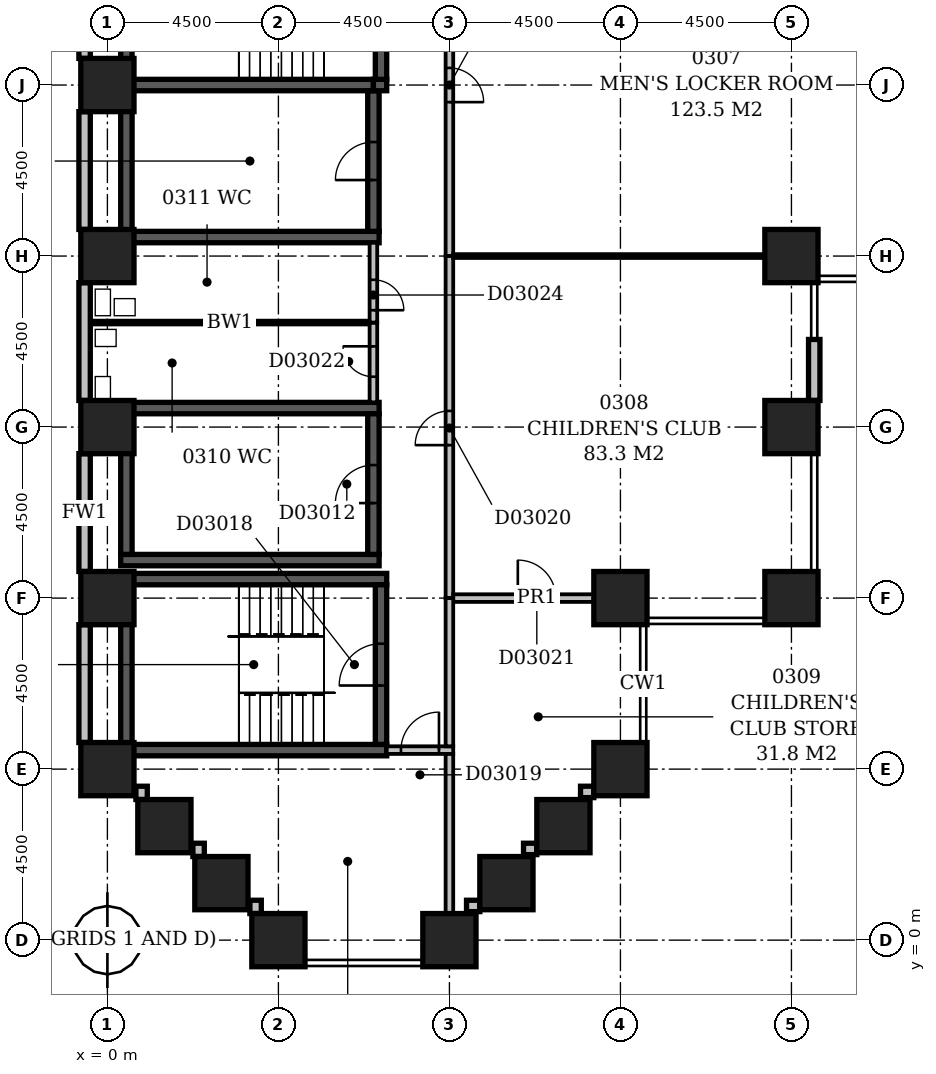
"""IFC4 building model, lengths in metres.
Left out: names, types, materials, properties, quantities, classifications, styles, units other than length and angle.
Written with IfcOpenShell. Run it as: python <this file> out.ifc"""

import sys

from ifc_helpers import new_model, si_unit, direction, frame, frame_2d, origin, origin_2d, place, context, subcontext, project, spatial, rectangle, extrude, element, fill, save


model = new_model("IFC4")
c1 = context("Model", 3, precision=1e-05, world=origin(), true_north=direction((0.0, 1.0)))
c2 = subcontext(c1, "Body", "Model", "MODEL_VIEW")
j1 = project(units=[si_unit("LENGTHUNIT", "METRE"), si_unit("PLANEANGLEUNIT", "RADIAN")], contexts=[c1])
p1 = place(None, origin())
s1 = spatial("IfcSite", under=j1, at=p1, CompositionType="ELEMENT")
p2 = place(p1, origin())
s2 = spatial("IfcBuilding", under=s1, at=p2, CompositionType="ELEMENT")
p3 = place(p2, frame((0.0, 0.0, 19.0)))
s3 = spatial("IfcBuildingStorey", under=s2, at=p3, CompositionType="ELEMENT", Elevation=19.0)
for number, where, z_axis, x_axis in (
    (1, (0.35, 5.0, -0.4), (0.0, 0.0, 1.0), (1.0, 0.0, 0.0)),
    (2, (0.35, 9.5, -0.4), (0.0, 0.0, 1.0), (1.0, 0.0, 0.0)),
):
    element("IfcWall", number, at=place(p3, frame(where, z_axis=z_axis, x_axis=x_axis)), inside=s3, PredefinedType="SHEAR", context=c2, shape_type="SweptSolid", body=[
        extrude(rectangle(XDim=7.0, YDim=0.3, at=frame_2d((3.5, 0.0))), origin(), (0.0, 0.0, 1.0), 4.95),
    ])
for number, where, z_axis, x_axis in (
    (3, (0.35, 10.0, -0.4), (0.0, 0.0, 1.0), (1.0, 0.0, 0.0)),
    (4, (0.35, 14.0, -0.4), (0.0, 0.0, 1.0), (1.0, 0.0, 0.0)),
    (5, (0.35, 18.5, -0.4), (0.0, 0.0, 1.0), (1.0, 0.0, 0.0)),
):
    element("IfcWall", number, at=place(p3, frame(where, z_axis=z_axis, x_axis=x_axis)), inside=s3, PredefinedType="SHEAR", context=c2, shape_type="SweptSolid", body=[
        extrude(rectangle(XDim=6.8, YDim=0.3, at=frame_2d((3.4, 0.0))), origin(), (0.0, 0.0, 1.0), 4.95),
    ])
p4 = place(p3, frame((0.35, 22.5, -0.4), z_axis=(0.0, 0.0, 1.0), x_axis=(1.0, 0.0, 0.0)))
e6 = element("IfcWall", 6, at=p4, inside=s3, PredefinedType="SHEAR", context=c2, shape_type="SweptSolid", body=[
    extrude(rectangle(XDim=6.65, YDim=0.3, at=frame_2d((3.325, 0.0))), origin(), (0.0, 0.0, 1.0), 4.95),
])
p5 = place(p3, frame((0.5, 5.15, -0.4), z_axis=(0.0, 0.0, 1.0), x_axis=(0.0, 1.0, 0.0)))
e7 = element("IfcWall", 7, at=p5, inside=s3, PredefinedType="SHEAR", context=c2, shape_type="SweptSolid", body=[
    extrude(rectangle(XDim=4.2, YDim=0.3, at=frame_2d((2.1, 0.0))), origin(), (0.0, 0.0, 1.0), 4.95),
])
for number, where, z_axis, x_axis in (
    (8, (0.5, 10.15, -0.4), (0.0, 0.0, 1.0), (0.0, 1.0, 0.0)),
    (9, (0.5, 18.65, -0.4), (0.0, 0.0, 1.0), (0.0, 1.0, 0.0)),
):
    element("IfcWall", number, at=place(p3, frame(where, z_axis=z_axis, x_axis=x_axis)), inside=s3, PredefinedType="SHEAR", context=c2, shape_type="SweptSolid", body=[
        extrude(rectangle(XDim=3.7, YDim=0.3, at=frame_2d((1.85, 0.0))), origin(), (0.0, 0.0, 1.0), 4.95),
    ])
p6 = place(p3, frame((0.5, 22.65, -0.4), z_axis=(0.0, 0.0, 1.0), x_axis=(0.0, 1.0, 0.0)))
e10 = element("IfcWall", 10, at=p6, inside=s3, PredefinedType="SHEAR", context=c2, shape_type="SweptSolid", body=[
    extrude(rectangle(XDim=4.2, YDim=0.3, at=frame_2d((2.1, 0.0))), origin(), (0.0, 0.0, 1.0), 4.95),
])
p7 = place(p3, frame((7.0, 10.15, -0.4), z_axis=(0.0, 0.0, 1.0), x_axis=(0.0, 1.0, 0.0)))
e11 = element("IfcWall", 11, at=p7, inside=s3, PredefinedType="SHEAR", context=c2, shape_type="SweptSolid", body=[
    extrude(rectangle(XDim=3.7, YDim=0.3, at=frame_2d((1.85, 0.0))), origin(), (0.0, 0.0, 1.0), 4.95),
])
p8 = place(p7, frame((1.35, 0.0, 0.4)))
e12 = element("IfcOpeningElement", 12, at=p8, cuts=e11, PredefinedType="OPENING", context=c2, shape_type="SweptSolid", body=[
    extrude(rectangle(XDim=1.0, YDim=2.1, at=frame_2d((0.5, 1.05))), frame((0.0, 0.162, 0.0), z_axis=(0.0, -1.0, 0.0), x_axis=(1.0, 0.0, 0.0)), (0.0, 0.0, 1.0), 0.324),
])
p9 = place(p3, frame((7.0, 18.65, -0.4), z_axis=(0.0, 0.0, 1.0), x_axis=(0.0, 1.0, 0.0)))
e13 = element("IfcWall", 13, at=p9, inside=s3, PredefinedType="SHEAR", context=c2, shape_type="SweptSolid", body=[
    extrude(rectangle(XDim=3.7, YDim=0.3, at=frame_2d((1.85, 0.0))), origin(), (0.0, 0.0, 1.0), 4.95),
])
p10 = place(p9, frame((1.35, 0.0, 0.4)))
e14 = element("IfcOpeningElement", 14, at=p10, cuts=e13, PredefinedType="OPENING", context=c2, shape_type="SweptSolid", body=[
    extrude(rectangle(XDim=1.0, YDim=2.1, at=frame_2d((0.5, 1.05))), frame((0.0, 0.162, 0.0), z_axis=(0.0, -1.0, 0.0), x_axis=(1.0, 0.0, 0.0)), (0.0, 0.0, 1.0), 0.324),
])
p11 = place(p3, frame((7.0, 22.5, -0.4), z_axis=(0.0, 0.0, 1.0), x_axis=(1.0, 0.0, 0.0)))
e15 = element("IfcWall", 15, at=p11, inside=s3, PredefinedType="SHEAR", context=c2, shape_type="SweptSolid", body=[
    extrude(rectangle(XDim=0.35, YDim=0.3, at=frame_2d((0.175, 0.0))), origin(), (0.0, 0.0, 1.0), 4.95),
])
p12 = place(p3, frame((7.2, 5.15, -0.4), z_axis=(0.0, 0.0, 1.0), x_axis=(0.0, 1.0, 0.0)))
e16 = element("IfcWall", 16, at=p12, inside=s3, PredefinedType="SHEAR", context=c2, shape_type="SweptSolid", body=[
    extrude(rectangle(XDim=4.2, YDim=0.3, at=frame_2d((2.1, 0.0))), origin(), (0.0, 0.0, 1.0), 4.95),
])
p13 = place(p12, frame((1.55, 0.0, 0.4)))
e17 = element("IfcOpeningElement", 17, at=p13, cuts=e16, PredefinedType="OPENING", context=c2, shape_type="SweptSolid", body=[
    extrude(rectangle(XDim=1.1, YDim=2.1, at=frame_2d((0.55, 1.05))), frame((0.0, 0.162, 0.0), z_axis=(0.0, -1.0, 0.0), x_axis=(1.0, 0.0, 0.0)), (0.0, 0.0, 1.0), 0.324),
])
p14 = place(p3, frame((7.2, 22.65, -0.4), z_axis=(0.0, 0.0, 1.0), x_axis=(0.0, 1.0, 0.0)))
e18 = element("IfcWall", 18, at=p14, inside=s3, PredefinedType="SHEAR", context=c2, shape_type="SweptSolid", body=[
    extrude(rectangle(XDim=4.2, YDim=0.3, at=frame_2d((2.1, 0.0))), origin(), (0.0, 0.0, 1.0), 4.95),
])
p15 = place(p14, frame((0.8, 0.0, 0.4)))
e19 = element("IfcOpeningElement", 19, at=p15, cuts=e18, PredefinedType="OPENING", context=c2, shape_type="SweptSolid", body=[
    extrude(rectangle(XDim=1.1, YDim=2.1, at=frame_2d((0.55, 1.05))), frame((0.0, 0.162, 0.0), z_axis=(0.0, -1.0, 0.0), x_axis=(1.0, 0.0, 0.0)), (0.0, 0.0, 1.0), 0.324),
])
for number, where, z_axis, x_axis in (
    (20, (4.5, 0.0, -0.4), (0.0, 0.0, 1.0), (1.0, 0.0, 0.0)),
    (21, (9.0, 0.0, -0.4), (0.0, 0.0, 1.0), (1.0, 0.0, 0.0)),
    (22, (3.0, 1.5, -0.4), (0.0, 0.0, 1.0), (1.0, 0.0, 0.0)),
    (23, (10.5, 1.5, -0.4), (0.0, 0.0, 1.0), (1.0, 0.0, 0.0)),
    (24, (1.5, 3.0, -0.4), (0.0, 0.0, 1.0), (1.0, 0.0, 0.0)),
    (25, (12.0, 3.0, -0.4), (0.0, 0.0, 1.0), (1.0, 0.0, 0.0)),
    (26, (0.0, 4.5, -0.4), (0.0, 0.0, 1.0), (1.0, 0.0, 0.0)),
    (27, (13.5, 4.5, -0.4), (0.0, 0.0, 1.0), (1.0, 0.0, 0.0)),
    (28, (0.0, 9.0, -0.4), (0.0, 0.0, 1.0), (1.0, 0.0, 0.0)),
    (29, (13.5, 9.0, -0.4), (0.0, 0.0, 1.0), (1.0, 0.0, 0.0)),
    (30, (18.0, 9.0, -0.4), (0.0, 0.0, 1.0), (1.0, 0.0, 0.0)),
    (31, (0.0, 13.5, -0.4), (0.0, 0.0, 1.0), (1.0, 0.0, 0.0)),
    (32, (18.0, 13.5, -0.4), (0.0, 0.0, 1.0), (1.0, 0.0, 0.0)),
    (33, (0.0, 18.0, -0.4), (0.0, 0.0, 1.0), (1.0, 0.0, 0.0)),
    (34, (18.0, 18.0, -0.4), (0.0, 0.0, 1.0), (1.0, 0.0, 0.0)),
    (35, (0.0, 22.5, -0.4), (0.0, 0.0, 1.0), (1.0, 0.0, 0.0)),
):
    element("IfcColumn", number, at=place(p3, frame(where, z_axis=z_axis, x_axis=x_axis)), inside=s3, PredefinedType="COLUMN", context=c2, shape_type="SweptSolid", body=[
        extrude(rectangle(XDim=1.4, YDim=1.4, at=origin_2d()), origin(), (0.0, 0.0, 1.0), 4.95),
    ])
for number, where, z_axis, x_axis in (
    (36, (9.45, 0.9, 0.0), (0.0, 0.0, 1.0), (1.0, 0.0, 0.0)),
    (37, (10.95, 2.4, 0.0), (0.0, 0.0, 1.0), (1.0, 0.0, 0.0)),
    (38, (12.45, 3.9, 0.0), (0.0, 0.0, 1.0), (1.0, 0.0, 0.0)),
):
    element("IfcWall", number, at=place(p3, frame(where, z_axis=z_axis, x_axis=x_axis)), inside=s3, PredefinedType="STANDARD", context=c2, shape_type="SweptSolid", body=[
        extrude(rectangle(XDim=0.35, YDim=0.3, at=frame_2d((0.175, 0.0))), origin(), (0.0, 0.0, 1.0), 3.9),
    ])
p16 = place(p3, frame((18.6, 14.2, 0.0), z_axis=(0.0, 0.0, 1.0), x_axis=(0.0, 1.0, 0.0)))
e39 = element("IfcWall", 39, at=p16, inside=s3, PredefinedType="STANDARD", context=c2, shape_type="SweptSolid", body=[
    extrude(rectangle(XDim=1.605, YDim=0.3, at=frame_2d((0.803, 0.0))), origin(), (0.0, 0.0, 1.0), 3.9),
])
for number, where, z_axis, x_axis in (
    (40, (-0.6, 26.3, 0.0), (0.0, 0.0, 1.0), (0.0, -1.0, 0.0)),
    (41, (-0.6, 21.8, 0.0), (0.0, 0.0, 1.0), (0.0, -1.0, 0.0)),
    (42, (-0.6, 17.3, 0.0), (0.0, 0.0, 1.0), (0.0, -1.0, 0.0)),
    (43, (-0.6, 12.8, 0.0), (0.0, 0.0, 1.0), (0.0, -1.0, 0.0)),
    (44, (-0.6, 8.3, 0.0), (0.0, 0.0, 1.0), (0.0, -1.0, 0.0)),
):
    element("IfcWall", number, at=place(p3, frame(where, z_axis=z_axis, x_axis=x_axis)), inside=s3, PredefinedType="STANDARD", context=c2, shape_type="SweptSolid", body=[
        extrude(rectangle(XDim=3.1, YDim=0.3, at=frame_2d((1.55, 0.0))), origin(), (0.0, 0.0, 1.0), 3.9),
    ])
for number, where, z_axis, x_axis in (
    (45, (0.9, 4.05, 0.0), (0.0, 0.0, 1.0), (0.0, -1.0, 0.0)),
    (46, (2.4, 2.55, 0.0), (0.0, 0.0, 1.0), (0.0, -1.0, 0.0)),
    (47, (3.9, 1.05, 0.0), (0.0, 0.0, 1.0), (0.0, -1.0, 0.0)),
):
    element("IfcWall", number, at=place(p3, frame(where, z_axis=z_axis, x_axis=x_axis)), inside=s3, PredefinedType="STANDARD", context=c2, shape_type="SweptSolid", body=[
        extrude(rectangle(XDim=0.35, YDim=0.3, at=frame_2d((0.175, 0.0))), origin(), (0.0, 0.0, 1.0), 3.9),
    ])
p17 = place(p3, frame((9.0, 0.0, 0.0), z_axis=(0.0, 0.0, 1.0), x_axis=(0.0, 1.0, 0.0)))
e48 = element("IfcWall", 48, at=p17, inside=s3, PredefinedType="PARTITIONING", context=c2, shape_type="SweptSolid", body=[
    extrude(rectangle(XDim=4.9, YDim=0.2, at=frame_2d((2.45, 0.0))), origin(), (0.0, 0.0, 1.0), 4.55),
])
p18 = place(p3, frame((7.35, 5.0, 0.0), z_axis=(0.0, 0.0, 1.0), x_axis=(1.0, 0.0, 0.0)))
e49 = element("IfcWall", 49, at=p18, inside=s3, PredefinedType="PARTITIONING", context=c2, shape_type="SweptSolid", body=[
    extrude(rectangle(XDim=1.75, YDim=0.2, at=frame_2d((0.875, 0.0))), origin(), (0.0, 0.0, 1.0), 4.55),
])
p19 = place(p18, frame((0.375, 0.0, 0.0)))
e50 = element("IfcOpeningElement", 50, at=p19, cuts=e49, PredefinedType="OPENING", context=c2, shape_type="SweptSolid", body=[
    extrude(rectangle(XDim=1.0, YDim=2.1, at=frame_2d((0.5, 1.05))), frame((0.0, 0.112, 0.0), z_axis=(0.0, -1.0, 0.0), x_axis=(1.0, 0.0, 0.0)), (0.0, 0.0, 1.0), 0.224),
])
p20 = place(p3, frame((9.0, 5.1, 0.0), z_axis=(0.0, 0.0, 1.0), x_axis=(0.0, 1.0, 0.0)))
e51 = element("IfcWall", 51, at=p20, inside=s3, PredefinedType="PARTITIONING", context=c2, shape_type="SweptSolid", body=[
    extrude(rectangle(XDim=3.9, YDim=0.2, at=frame_2d((1.95, 0.0))), origin(), (0.0, 0.0, 1.0), 4.55),
])
p21 = place(p3, frame((9.0, 9.0, 0.0), z_axis=(0.0, 0.0, 1.0), x_axis=(0.0, 1.0, 0.0)))
e52 = element("IfcWall", 52, at=p21, inside=s3, PredefinedType="PARTITIONING", context=c2, shape_type="SweptSolid", body=[
    extrude(rectangle(XDim=9.0, YDim=0.2, at=frame_2d((4.5, 0.0))), origin(), (0.0, 0.0, 1.0), 4.55),
])
p22 = place(p21, frame((4.025, 0.0, 0.0)))
e53 = element("IfcOpeningElement", 53, at=p22, cuts=e52, PredefinedType="OPENING", context=c2, shape_type="SweptSolid", body=[
    extrude(rectangle(XDim=0.9, YDim=2.1, at=frame_2d((0.45, 1.05))), frame((0.0, 0.112, 0.0), z_axis=(0.0, -1.0, 0.0), x_axis=(1.0, 0.0, 0.0)), (0.0, 0.0, 1.0), 0.224),
])
p23 = place(p3, frame((13.5, 9.0, 0.0), z_axis=(0.0, 0.0, 1.0), x_axis=(-1.0, 0.0, 0.0)))
e54 = element("IfcWall", 54, at=p23, inside=s3, PredefinedType="PARTITIONING", context=c2, shape_type="SweptSolid", body=[
    extrude(rectangle(XDim=4.4, YDim=0.2, at=frame_2d((2.2, 0.0))), origin(), (0.0, 0.0, 1.0), 4.55),
])
p24 = place(p23, frame((1.7, 0.0, 0.0)))
e55 = element("IfcOpeningElement", 55, at=p24, cuts=e54, PredefinedType="OPENING", context=c2, shape_type="SweptSolid", body=[
    extrude(rectangle(XDim=1.0, YDim=2.1, at=frame_2d((0.5, 1.05))), frame((0.0, 0.112, 0.0), z_axis=(0.0, -1.0, 0.0), x_axis=(1.0, 0.0, 0.0)), (0.0, 0.0, 1.0), 0.224),
])
p25 = place(p3, frame((14.2, 9.0, 0.0), z_axis=(0.0, 0.0, 1.0), x_axis=(-1.0, 0.0, 0.0)))
e56 = element("IfcWall", 56, at=p25, inside=s3, PredefinedType="PARTITIONING", context=c2, shape_type="SweptSolid", body=[
    extrude(rectangle(XDim=0.7, YDim=0.2, at=frame_2d((0.35, 0.0))), origin(), (0.0, 0.0, 1.0), 3.9),
])
p26 = place(p3, frame((-0.45, 16.25, 0.0), z_axis=(0.0, 0.0, 1.0), x_axis=(1.0, 0.0, 0.0)))
e57 = element("IfcWall", 57, at=p26, inside=s3, PredefinedType="PLUMBINGWALL", context=c2, shape_type="SweptSolid", body=[
    extrude(rectangle(XDim=7.35, YDim=0.1, at=frame_2d((3.675, 0.0))), origin(), (0.0, 0.0, 1.0), 4.55),
])
p27 = place(p3, frame((7.0, 16.25, 0.0), z_axis=(0.0, 0.0, 1.0), x_axis=(0.0, -1.0, 0.0)))
e58 = element("IfcWall", 58, at=p27, inside=s3, PredefinedType="PARTITIONING", context=c2, shape_type="SweptSolid", body=[
    extrude(rectangle(XDim=2.1, YDim=0.2, at=frame_2d((1.05, 0.0))), origin(), (0.0, 0.0, 1.0), 4.55),
])
p28 = place(p27, frame((0.625, 0.0, 0.0)))
e59 = element("IfcOpeningElement", 59, at=p28, cuts=e58, PredefinedType="OPENING", context=c2, shape_type="SweptSolid", body=[
    extrude(rectangle(XDim=0.8, YDim=2.1, at=frame_2d((0.4, 1.05))), frame((0.0, 0.112, 0.0), z_axis=(0.0, -1.0, 0.0), x_axis=(1.0, 0.0, 0.0)), (0.0, 0.0, 1.0), 0.224),
])
p29 = place(p3, frame((9.0, 18.0, 0.0), z_axis=(0.0, 0.0, 1.0), x_axis=(0.0, 1.0, 0.0)))
e60 = element("IfcWall", 60, at=p29, inside=s3, PredefinedType="PARTITIONING", context=c2, shape_type="SweptSolid", body=[
    extrude(rectangle(XDim=9.0, YDim=0.2, at=frame_2d((4.5, 0.0))), origin(), (0.0, 0.0, 1.0), 4.55),
])
p30 = place(p29, frame((4.05, 0.0, 0.0)))
e61 = element("IfcOpeningElement", 61, at=p30, cuts=e60, PredefinedType="OPENING", context=c2, shape_type="SweptSolid", body=[
    extrude(rectangle(XDim=0.9, YDim=2.1, at=frame_2d((0.45, 1.05))), frame((0.0, 0.112, 0.0), z_axis=(0.0, -1.0, 0.0), x_axis=(1.0, 0.0, 0.0)), (0.0, 0.0, 1.0), 0.224),
])
p31 = place(p3, frame((18.0, 18.0, 0.0), z_axis=(0.0, 0.0, 1.0), x_axis=(-1.0, 0.0, 0.0)))
e62 = element("IfcWall", 62, at=p31, inside=s3, PredefinedType="PARTITIONING", context=c2, shape_type="SweptSolid", body=[
    extrude(rectangle(XDim=8.9, YDim=0.1, at=frame_2d((4.45, 0.0))), origin(), (0.0, 0.0, 1.0), 3.85),
])
p32 = place(p3, frame((18.7, 18.0, 0.0), z_axis=(0.0, 0.0, 1.0), x_axis=(-1.0, 0.0, 0.0)))
e63 = element("IfcWall", 63, at=p32, inside=s3, PredefinedType="PARTITIONING", context=c2, shape_type="SweptSolid", body=[
    extrude(rectangle(XDim=0.7, YDim=0.1, at=frame_2d((0.35, 0.0))), origin(), (0.0, 0.0, 1.0), 3.9),
])
p33 = place(p3, frame((7.0, 18.35, 0.0), z_axis=(0.0, 0.0, 1.0), x_axis=(0.0, -1.0, 0.0)))
e64 = element("IfcWall", 64, at=p33, inside=s3, PredefinedType="PARTITIONING", context=c2, shape_type="SweptSolid", body=[
    extrude(rectangle(XDim=2.1, YDim=0.2, at=frame_2d((1.05, 0.0))), origin(), (0.0, 0.0, 1.0), 4.55),
])
p34 = place(p33, frame((0.975, 0.0, 0.0)))
e65 = element("IfcOpeningElement", 65, at=p34, cuts=e64, PredefinedType="OPENING", context=c2, shape_type="SweptSolid", body=[
    extrude(rectangle(XDim=0.8, YDim=2.1, at=frame_2d((0.4, 1.05))), frame((0.0, 0.112, 0.0), z_axis=(0.0, -1.0, 0.0), x_axis=(1.0, 0.0, 0.0)), (0.0, 0.0, 1.0), 0.224),
])
p35 = place(p10, origin())
e66 = element("IfcDoor", 66, at=p35, inside=s3, OperationType="SINGLE_SWING_LEFT", PredefinedType="DOOR", context=c2, shape_type="SweptSolid", body=[
    extrude(rectangle(XDim=1.0, YDim=2.1, at=frame_2d((0.5, 1.05))), frame((0.0, 0.025, 0.0), z_axis=(0.0, -1.0, 0.0), x_axis=(1.0, 0.0, 0.0)), (0.0, 0.0, 1.0), 0.05),
])
fill(e14, e66)
p36 = place(p8, origin())
e67 = element("IfcDoor", 67, at=p36, inside=s3, OperationType="SINGLE_SWING_LEFT", PredefinedType="DOOR", context=c2, shape_type="SweptSolid", body=[
    extrude(rectangle(XDim=1.0, YDim=2.1, at=frame_2d((0.5, 1.05))), frame((0.0, 0.025, 0.0), z_axis=(0.0, -1.0, 0.0), x_axis=(1.0, 0.0, 0.0)), (0.0, 0.0, 1.0), 0.05),
])
fill(e12, e67)
p37 = place(p13, origin())
e68 = element("IfcDoor", 68, at=p37, inside=s3, OperationType="SINGLE_SWING_LEFT", PredefinedType="DOOR", context=c2, shape_type="SweptSolid", body=[
    extrude(rectangle(XDim=1.1, YDim=2.1, at=frame_2d((0.55, 1.05))), frame((0.0, 0.025, 0.0), z_axis=(0.0, -1.0, 0.0), x_axis=(1.0, 0.0, 0.0)), (0.0, 0.0, 1.0), 0.05),
])
fill(e17, e68)
p38 = place(p19, frame((1.0, 0.0, 0.0), z_axis=(0.0, 0.0, 1.0), x_axis=(-1.0, 0.0, 0.0)))
e69 = element("IfcDoor", 69, at=p38, inside=s3, OperationType="SINGLE_SWING_LEFT", PredefinedType="DOOR", context=c2, shape_type="SweptSolid", body=[
    extrude(rectangle(XDim=1.0, YDim=2.1, at=frame_2d((0.5, 1.05))), frame((0.0, 0.025, 0.0), z_axis=(0.0, -1.0, 0.0), x_axis=(1.0, 0.0, 0.0)), (0.0, 0.0, 1.0), 0.05),
])
fill(e50, e69)
p39 = place(p22, origin())
e70 = element("IfcDoor", 70, at=p39, inside=s3, OperationType="SINGLE_SWING_LEFT", PredefinedType="DOOR", context=c2, shape_type="SweptSolid", body=[
    extrude(rectangle(XDim=0.9, YDim=2.1, at=frame_2d((0.45, 1.05))), frame((0.0, 0.025, 0.0), z_axis=(0.0, -1.0, 0.0), x_axis=(1.0, 0.0, 0.0)), (0.0, 0.0, 1.0), 0.05),
])
fill(e53, e70)
p40 = place(p24, origin())
e71 = element("IfcDoor", 71, at=p40, inside=s3, OperationType="SINGLE_SWING_RIGHT", PredefinedType="DOOR", context=c2, shape_type="SweptSolid", body=[
    extrude(rectangle(XDim=1.0, YDim=2.1, at=frame_2d((0.5, 1.05))), frame((0.0, 0.025, 0.0), z_axis=(0.0, -1.0, 0.0), x_axis=(1.0, 0.0, 0.0)), (0.0, 0.0, 1.0), 0.05),
])
fill(e55, e71)
p41 = place(p28, frame((0.8, 0.0, 0.0), z_axis=(0.0, 0.0, 1.0), x_axis=(-1.0, 0.0, 0.0)))
e72 = element("IfcDoor", 72, at=p41, inside=s3, OperationType="SINGLE_SWING_RIGHT", PredefinedType="DOOR", context=c2, shape_type="SweptSolid", body=[
    extrude(rectangle(XDim=0.8, YDim=2.1, at=frame_2d((0.4, 1.05))), frame((0.0, 0.025, 0.0), z_axis=(0.0, -1.0, 0.0), x_axis=(1.0, 0.0, 0.0)), (0.0, 0.0, 1.0), 0.05),
])
fill(e59, e72)
p42 = place(p30, frame((0.9, 0.0, 0.0), z_axis=(0.0, 0.0, 1.0), x_axis=(-1.0, 0.0, 0.0)))
e73 = element("IfcDoor", 73, at=p42, inside=s3, OperationType="SINGLE_SWING_RIGHT", PredefinedType="DOOR", context=c2, shape_type="SweptSolid", body=[
    extrude(rectangle(XDim=0.9, YDim=2.1, at=frame_2d((0.45, 1.05))), frame((0.0, 0.025, 0.0), z_axis=(0.0, -1.0, 0.0), x_axis=(1.0, 0.0, 0.0)), (0.0, 0.0, 1.0), 0.05),
])
fill(e61, e73)
p43 = place(p34, frame((0.8, 0.0, 0.0), z_axis=(0.0, 0.0, 1.0), x_axis=(-1.0, 0.0, 0.0)))
e74 = element("IfcDoor", 74, at=p43, inside=s3, OperationType="SINGLE_SWING_LEFT", PredefinedType="DOOR", context=c2, shape_type="SweptSolid", body=[
    extrude(rectangle(XDim=0.8, YDim=2.1, at=frame_2d((0.4, 1.05))), frame((0.0, 0.025, 0.0), z_axis=(0.0, -1.0, 0.0), x_axis=(1.0, 0.0, 0.0)), (0.0, 0.0, 1.0), 0.05),
])
fill(e65, e74)
save(model, sys.argv[1])
